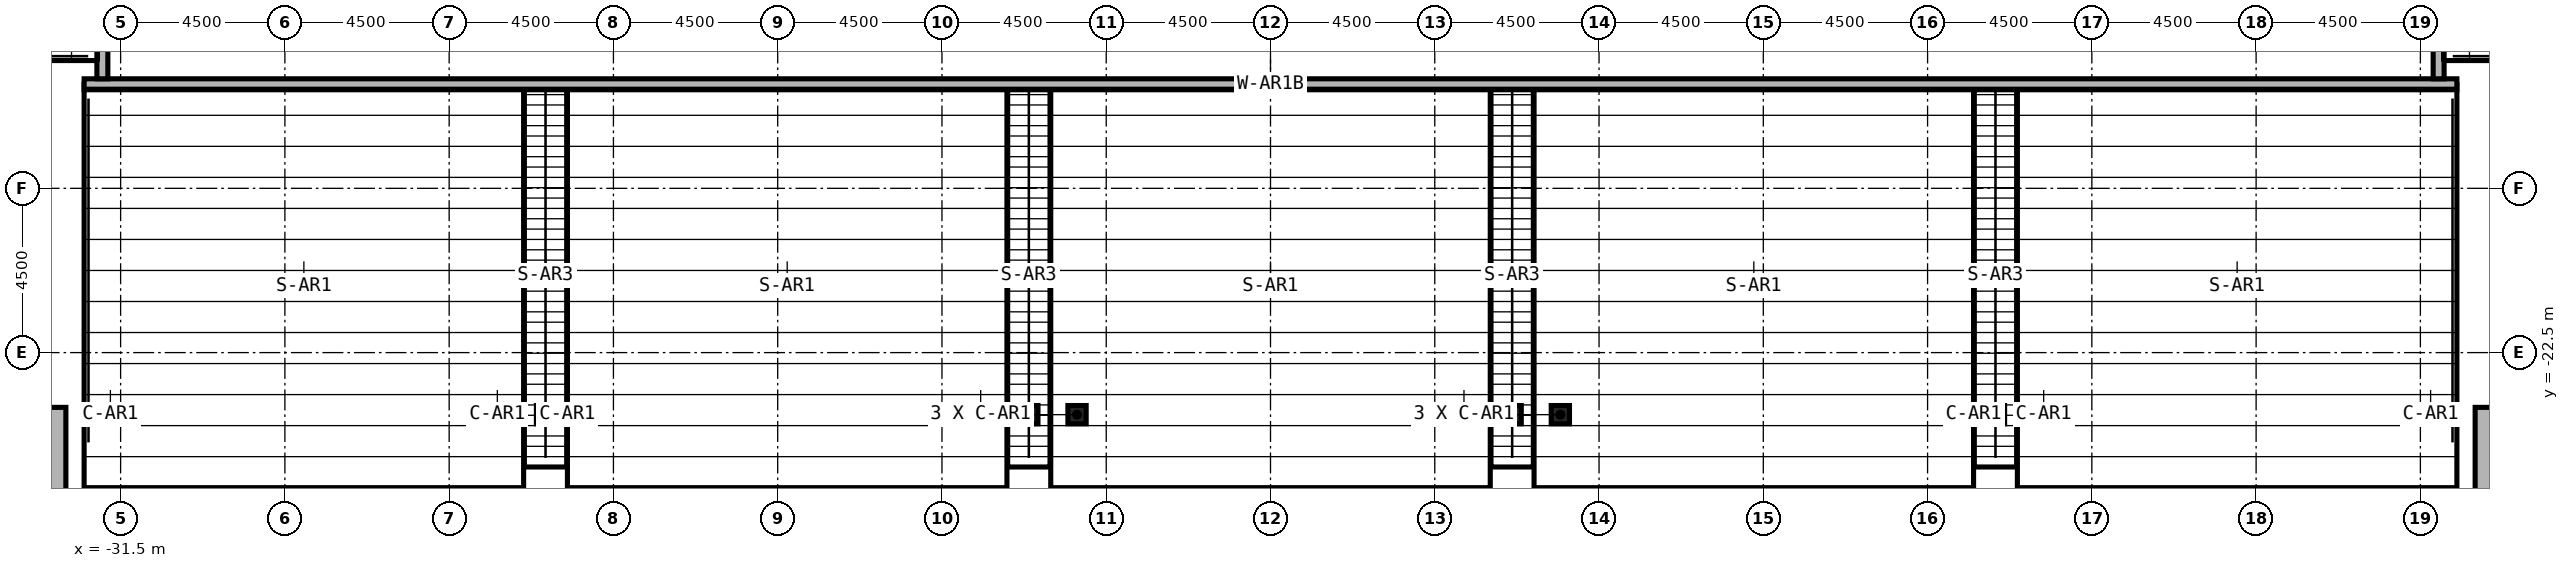
"""IFC4 building model, lengths in metres.
Left out: names, types, materials, properties, quantities, classifications, styles, units other than length and angle.
Written with IfcOpenShell. Run it as: python <this file> out.ifc"""

import sys

from ifc_helpers import new_model, si_unit, direction, frame, frame_2d, origin, origin_2d, place, context, subcontext, project, spatial, rectangle, hollow_rectangle, extrude, element, save


model = new_model("IFC4")
c1 = context("Model", 3, precision=1e-05, world=origin(), true_north=direction((0.0, 1.0)))
c2 = subcontext(c1, "Body", "Model", "MODEL_VIEW")
j1 = project(units=[si_unit("LENGTHUNIT", "METRE"), si_unit("PLANEANGLEUNIT", "RADIAN")], contexts=[c1])
p1 = place(None, origin())
s1 = spatial("IfcSite", under=j1, at=p1, CompositionType="ELEMENT")
p2 = place(p1, origin())
s2 = spatial("IfcBuilding", under=s1, at=p2, CompositionType="ELEMENT")
p3 = place(p2, frame((0.0, 0.0, 12.0)))
s3 = spatial("IfcBuildingStorey", under=s2, at=p3, CompositionType="ELEMENT", Elevation=12.0)
p4 = place(p3, frame((33.3, -39.0, 0.0), z_axis=(0.0, 0.0, 1.0), x_axis=(0.0, 1.0, 0.0)))
e1 = element("IfcWall", 1, at=p4, inside=s3, PredefinedType="SHEAR", context=c2, shape_type="SweptSolid", body=[
    extrude(rectangle(XDim=15.0, YDim=0.6, at=frame_2d((7.5, 0.0))), origin(), (0.0, 0.0, 1.0), 7.0),
])
p5 = place(p4, frame((2.95, 0.0, 0.0)))
e2 = element("IfcOpeningElement", 2, at=p5, cuts=e1, PredefinedType="OPENING", context=c2, shape_type="SweptSolid", body=[
    extrude(rectangle(XDim=2.0, YDim=2.4, at=frame_2d((1.0, 1.2))), frame((0.0, 0.3, 0.0), z_axis=(0.0, -1.0, 0.0), x_axis=(1.0, 0.0, 0.0)), (0.0, 0.0, 1.0), 0.6),
])
p6 = place(p3, frame((-33.3, -39.0, 0.0), z_axis=(0.0, 0.0, 1.0), x_axis=(0.0, 1.0, 0.0)))
e3 = element("IfcWall", 3, at=p6, inside=s3, PredefinedType="SHEAR", context=c2, shape_type="SweptSolid", body=[
    extrude(rectangle(XDim=15.0, YDim=0.6, at=frame_2d((7.5, 0.0))), origin(), (0.0, 0.0, 1.0), 7.0),
])
p7 = place(p6, frame((2.95, 0.0, 0.0)))
e4 = element("IfcOpeningElement", 4, at=p7, cuts=e3, PredefinedType="OPENING", context=c2, shape_type="SweptSolid", body=[
    extrude(rectangle(XDim=2.0, YDim=2.4, at=frame_2d((1.0, 1.2))), frame((0.0, 0.3, 0.0), z_axis=(0.0, -1.0, 0.0), x_axis=(1.0, 0.0, 0.0)), (0.0, 0.0, 1.0), 0.6),
])
p8 = place(p3, frame((32.5, -15.15, 0.0), z_axis=(0.0, 0.0, 1.0), x_axis=(-1.0, 0.0, 0.0)))
e5 = element("IfcWall", 5, at=p8, inside=s3, PredefinedType="SOLIDWALL", context=c2, shape_type="SweptSolid", body=[
    extrude(rectangle(XDim=65.0, YDim=0.3, at=frame_2d((32.5, 0.0))), origin(), (0.0, 0.0, 1.0), 2.125),
])
for number, where, z_axis, x_axis in (
    (6, (32.0, -15.0, 0.0), (0.0, 0.0, 1.0), (0.0, 1.0, 0.0)),
    (7, (-32.0, -1.95, 0.0), (0.0, 0.0, 1.0), (0.0, -1.0, 0.0)),
):
    element("IfcWall", number, at=place(p3, frame(where, z_axis=z_axis, x_axis=x_axis)), inside=s3, PredefinedType="SOLIDWALL", context=c2, shape_type="SweptSolid", body=[
        extrude(rectangle(XDim=13.05, YDim=0.3, at=frame_2d((6.525, 0.0))), origin(), (0.0, 0.0, 1.0), 2.0),
    ])
for number, where, z_axis, x_axis in (
    (8, (31.78, -24.2, 0.0), (0.0, 0.0, 1.0), (1.0, 0.0, 0.0)),
    (9, (21.18, -24.2, 0.0), (0.0, 0.0, 1.0), (1.0, 0.0, 0.0)),
    (10, (7.94, -24.2, 0.0), (0.0, 0.0, 1.0), (1.0, 0.0, 0.0)),
    (11, (5.3, -24.2, 0.0), (0.0, 0.0, 1.0), (1.0, 0.0, 0.0)),
    (12, (-5.3, -24.2, 0.0), (0.0, 0.0, 1.0), (1.0, 0.0, 0.0)),
    (13, (-7.94, -24.2, 0.0), (0.0, 0.0, 1.0), (1.0, 0.0, 0.0)),
    (14, (-21.18, -24.2, 0.0), (0.0, 0.0, 1.0), (1.0, 0.0, 0.0)),
    (15, (-31.78, -24.2, 0.0), (0.0, 0.0, 1.0), (1.0, 0.0, 0.0)),
    (16, (19.86, -24.2, 0.0), (0.0, 0.0, 1.0), (1.0, 0.0, 0.0)),
    (17, (6.62, -24.2, 0.0), (0.0, 0.0, 1.0), (1.0, 0.0, 0.0)),
    (18, (-6.62, -24.2, 0.0), (0.0, 0.0, 1.0), (1.0, 0.0, 0.0)),
    (19, (-19.86, -24.2, 0.0), (0.0, 0.0, 1.0), (1.0, 0.0, 0.0)),
):
    element("IfcColumn", number, at=place(p3, frame(where, z_axis=z_axis, x_axis=x_axis)), inside=s3, PredefinedType="COLUMN", context=c2, shape_type="SweptSolid", body=[
        extrude(hollow_rectangle(XDim=0.5, YDim=0.6, WallThickness=0.03, at=origin_2d()), origin(), (0.0, 0.0, 1.0), 5.712),
    ])
save(model, sys.argv[1])
